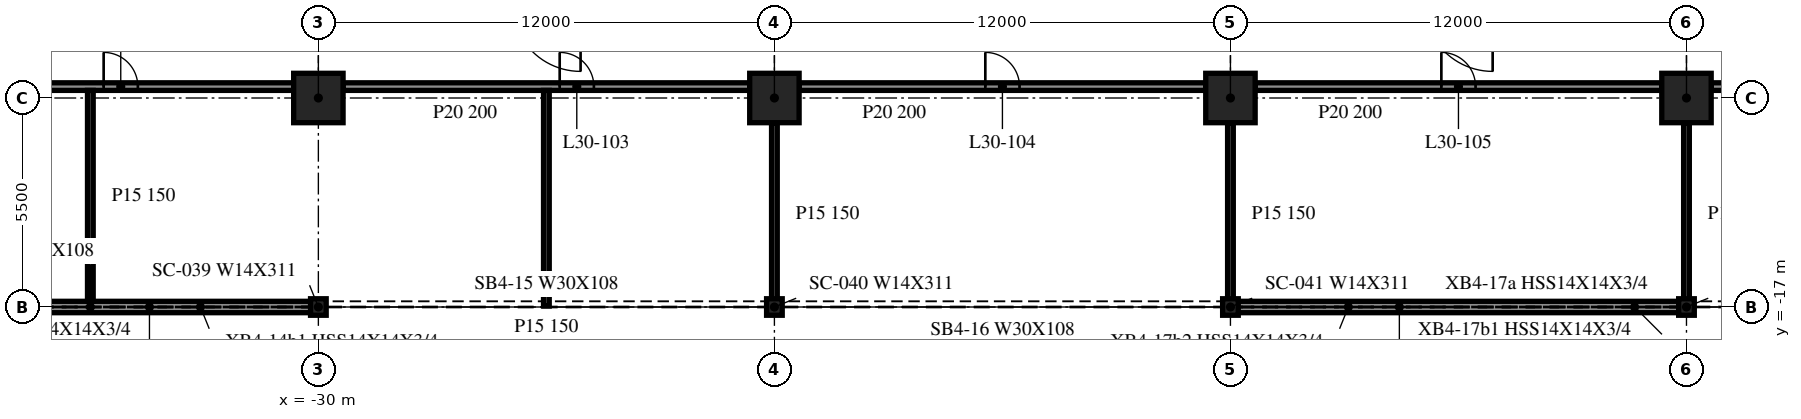
"""IFC4 building model, lengths in metres.
Left out: names, types, materials, properties, quantities, classifications, styles, units other than length and angle.
Written with IfcOpenShell. Run it as: python <this file> out.ifc"""

import sys

from ifc_helpers import new_model, si_unit, direction, frame, frame_2d, origin, origin_2d, place, context, subcontext, project, spatial, rectangle, i_section, extrude, element, fill, save


model = new_model("IFC4")
c1 = context("Model", 3, precision=1e-05, world=origin(), true_north=direction((0.0, 1.0)))
c2 = subcontext(c1, "Body", "Model", "MODEL_VIEW")
j1 = project(units=[si_unit("LENGTHUNIT", "METRE"), si_unit("PLANEANGLEUNIT", "RADIAN")], contexts=[c1])
p1 = place(None, origin())
s1 = spatial("IfcSite", under=j1, at=p1, CompositionType="ELEMENT")
p2 = place(p1, origin())
s2 = spatial("IfcBuilding", under=s1, at=p2, CompositionType="ELEMENT")
p3 = place(p2, frame((0.0, 0.0, 130.2)))
s3 = spatial("IfcBuildingStorey", under=s2, at=p3, CompositionType="ELEMENT", Elevation=130.2)
for number, where, z_axis, x_axis in (
    (1, (-30.0, -11.5, -0.34), (0.0, 0.0, 1.0), (1.0, 0.0, 0.0)),
    (2, (-18.0, -11.5, -0.34), (0.0, 0.0, 1.0), (1.0, 0.0, 0.0)),
    (3, (-6.0, -11.5, -0.34), (0.0, 0.0, 1.0), (1.0, 0.0, 0.0)),
    (4, (6.0, -11.5, -0.34), (0.0, 0.0, 1.0), (1.0, 0.0, 0.0)),
):
    element("IfcColumn", number, at=place(p3, frame(where, z_axis=z_axis, x_axis=x_axis)), inside=s3, PredefinedType="COLUMN", context=c2, shape_type="SweptSolid", body=[
        extrude(rectangle(XDim=1.3, YDim=1.3, at=origin_2d()), origin(), (0.0, 0.0, 1.0), 4.1),
    ])
for number, where, z_axis, x_axis in (
    (5, (-30.0, -17.0, -0.34), (0.0, 0.0, 1.0), (1.0, 0.0, 0.0)),
    (6, (-18.0, -17.0, -0.34), (0.0, 0.0, 1.0), (1.0, 0.0, 0.0)),
    (7, (-6.0, -17.0, -0.34), (0.0, 0.0, 1.0), (1.0, 0.0, 0.0)),
    (8, (6.0, -17.0, -0.34), (0.0, 0.0, 1.0), (1.0, 0.0, 0.0)),
):
    element("IfcColumn", number, at=place(p3, frame(where, z_axis=z_axis, x_axis=x_axis)), inside=s3, PredefinedType="COLUMN", context=c2, shape_type="SweptSolid", body=[
        extrude(i_section(OverallWidth=0.412, OverallDepth=0.434, WebThickness=0.036, FlangeThickness=0.057, at=origin_2d()), origin(), (0.0, 0.0, 1.0), 4.1),
    ])
for number, where, z_axis, x_axis in (
    (9, (-41.982, -17.0, 0.0), (0.0, 0.0, 1.0), (1.0, 0.0, 0.0)),
    (10, (-5.982, -17.0, 0.0), (0.0, 0.0, 1.0), (1.0, 0.0, 0.0)),
):
    element("IfcWall", number, at=place(p3, frame(where, z_axis=z_axis, x_axis=x_axis)), inside=s3, PredefinedType="NOTDEFINED", context=c2, shape_type="SweptSolid", body=[
        extrude(rectangle(XDim=11.964, YDim=0.3, at=frame_2d((5.982, 0.0))), origin(), (0.0, 0.0, 1.0), 3.003),
    ])
p4 = place(p3, frame((-41.35, -11.2, 0.0), z_axis=(0.0, 0.0, 1.0), x_axis=(1.0, 0.0, 0.0)))
e11 = element("IfcWall", 11, at=p4, inside=s3, PredefinedType="PARTITIONING", context=c2, shape_type="SweptSolid", body=[
    extrude(rectangle(XDim=10.7, YDim=0.2, at=frame_2d((5.35, 0.0))), origin(), (0.0, 0.0, 1.0), 3.76),
])
p5 = place(p4, frame((5.7, 0.0, 0.0)))
e12 = element("IfcOpeningElement", 12, at=p5, cuts=e11, PredefinedType="OPENING", context=c2, shape_type="SweptSolid", body=[
    extrude(rectangle(XDim=0.9, YDim=2.1, at=frame_2d((0.45, 1.05))), frame((0.0, 0.11, 0.0), z_axis=(0.0, -1.0, 0.0), x_axis=(1.0, 0.0, 0.0)), (0.0, 0.0, 1.0), 0.22),
])
p6 = place(p3, frame((-29.35, -11.2, 0.0), z_axis=(0.0, 0.0, 1.0), x_axis=(1.0, 0.0, 0.0)))
e13 = element("IfcWall", 13, at=p6, inside=s3, PredefinedType="PARTITIONING", context=c2, shape_type="SweptSolid", body=[
    extrude(rectangle(XDim=10.7, YDim=0.2, at=frame_2d((5.35, 0.0))), origin(), (0.0, 0.0, 1.0), 3.76),
])
p7 = place(p6, frame((5.7, 0.0, 0.0)))
e14 = element("IfcOpeningElement", 14, at=p7, cuts=e13, PredefinedType="OPENING", context=c2, shape_type="SweptSolid", body=[
    extrude(rectangle(XDim=0.9, YDim=2.1, at=frame_2d((0.45, 1.05))), frame((0.0, 0.11, 0.0), z_axis=(0.0, -1.0, 0.0), x_axis=(1.0, 0.0, 0.0)), (0.0, 0.0, 1.0), 0.22),
])
p8 = place(p3, frame((-17.35, -11.2, 0.0), z_axis=(0.0, 0.0, 1.0), x_axis=(1.0, 0.0, 0.0)))
e15 = element("IfcWall", 15, at=p8, inside=s3, PredefinedType="PARTITIONING", context=c2, shape_type="SweptSolid", body=[
    extrude(rectangle(XDim=10.7, YDim=0.2, at=frame_2d((5.35, 0.0))), origin(), (0.0, 0.0, 1.0), 3.76),
])
p9 = place(p8, frame((4.9, 0.0, 0.0)))
e16 = element("IfcOpeningElement", 16, at=p9, cuts=e15, PredefinedType="OPENING", context=c2, shape_type="SweptSolid", body=[
    extrude(rectangle(XDim=0.9, YDim=2.1, at=frame_2d((0.45, 1.05))), frame((0.0, 0.11, 0.0), z_axis=(0.0, -1.0, 0.0), x_axis=(1.0, 0.0, 0.0)), (0.0, 0.0, 1.0), 0.22),
])
p10 = place(p3, frame((-5.35, -11.2, 0.0), z_axis=(0.0, 0.0, 1.0), x_axis=(1.0, 0.0, 0.0)))
e17 = element("IfcWall", 17, at=p10, inside=s3, PredefinedType="PARTITIONING", context=c2, shape_type="SweptSolid", body=[
    extrude(rectangle(XDim=10.7, YDim=0.2, at=frame_2d((5.35, 0.0))), origin(), (0.0, 0.0, 1.0), 3.76),
])
p11 = place(p10, frame((4.9, 0.0, 0.0)))
e18 = element("IfcOpeningElement", 18, at=p11, cuts=e17, PredefinedType="OPENING", context=c2, shape_type="SweptSolid", body=[
    extrude(rectangle(XDim=0.9, YDim=2.1, at=frame_2d((0.45, 1.05))), frame((0.0, 0.11, 0.0), z_axis=(0.0, -1.0, 0.0), x_axis=(1.0, 0.0, 0.0)), (0.0, 0.0, 1.0), 0.22),
])
p12 = place(p3, frame((6.65, -11.2, 0.0), z_axis=(0.0, 0.0, 1.0), x_axis=(1.0, 0.0, 0.0)))
e19 = element("IfcWall", 19, at=p12, inside=s3, PredefinedType="PARTITIONING", context=c2, shape_type="SweptSolid", body=[
    extrude(rectangle(XDim=10.7, YDim=0.2, at=frame_2d((5.35, 0.0))), origin(), (0.0, 0.0, 1.0), 3.76),
])
p13 = place(p12, frame((4.1, 0.0, 0.0)))
e20 = element("IfcOpeningElement", 20, at=p13, cuts=e19, PredefinedType="OPENING", context=c2, shape_type="SweptSolid", body=[
    extrude(rectangle(XDim=0.9, YDim=2.1, at=frame_2d((0.45, 1.05))), frame((0.0, 0.11, 0.0), z_axis=(0.0, -1.0, 0.0), x_axis=(1.0, 0.0, 0.0)), (0.0, 0.0, 1.0), 0.22),
])
p14 = place(p12, frame((5.7, 0.0, 0.0)))
e21 = element("IfcOpeningElement", 21, at=p14, cuts=e19, PredefinedType="OPENING", context=c2, shape_type="SweptSolid", body=[
    extrude(rectangle(XDim=0.9, YDim=2.1, at=frame_2d((0.45, 1.05))), frame((0.0, 0.11, 0.0), z_axis=(0.0, -1.0, 0.0), x_axis=(1.0, 0.0, 0.0)), (0.0, 0.0, 1.0), 0.22),
])
p15 = place(p3, frame((-36.0, -16.85, 0.0), z_axis=(0.0, 0.0, 1.0), x_axis=(0.0, 1.0, 0.0)))
e22 = element("IfcWall", 22, at=p15, inside=s3, PredefinedType="PARTITIONING", context=c2, shape_type="SweptSolid", body=[
    extrude(rectangle(XDim=5.55, YDim=0.15, at=frame_2d((2.775, 0.0))), origin(), (0.0, 0.0, 1.0), 3.76),
])
p16 = place(p3, frame((-24.0, -16.975, 0.0), z_axis=(0.0, 0.0, 1.0), x_axis=(0.0, 1.0, 0.0)))
e23 = element("IfcWall", 23, at=p16, inside=s3, PredefinedType="PARTITIONING", context=c2, shape_type="SweptSolid", body=[
    extrude(rectangle(XDim=5.675, YDim=0.15, at=frame_2d((2.837, 0.0))), origin(), (0.0, 0.0, 1.0), 3.76),
])
for number, where, z_axis, x_axis in (
    (24, (-18.0, -16.975, 0.0), (0.0, 0.0, 1.0), (0.0, 1.0, 0.0)),
    (25, (-6.0, -16.975, 0.0), (0.0, 0.0, 1.0), (0.0, 1.0, 0.0)),
    (26, (6.0, -16.975, 0.0), (0.0, 0.0, 1.0), (0.0, 1.0, 0.0)),
):
    element("IfcWall", number, at=place(p3, frame(where, z_axis=z_axis, x_axis=x_axis)), inside=s3, PredefinedType="PARTITIONING", context=c2, shape_type="SweptSolid", body=[
        extrude(rectangle(XDim=4.825, YDim=0.15, at=frame_2d((2.413, 0.0))), origin(), (0.0, 0.0, 1.0), 3.76),
    ])
p17 = place(p5, origin())
e27 = element("IfcDoor", 27, at=p17, inside=s3, OperationType="SINGLE_SWING_LEFT", PredefinedType="DOOR", context=c2, shape_type="SweptSolid", body=[
    extrude(rectangle(XDim=0.9, YDim=2.1, at=frame_2d((0.45, 1.05))), frame((0.0, 0.025, 0.0), z_axis=(0.0, -1.0, 0.0), x_axis=(1.0, 0.0, 0.0)), (0.0, 0.0, 1.0), 0.05),
])
fill(e12, e27)
p18 = place(p7, origin())
e28 = element("IfcDoor", 28, at=p18, inside=s3, OperationType="SINGLE_SWING_LEFT", PredefinedType="DOOR", context=c2, shape_type="SweptSolid", body=[
    extrude(rectangle(XDim=0.9, YDim=2.1, at=frame_2d((0.45, 1.05))), frame((0.0, 0.025, 0.0), z_axis=(0.0, -1.0, 0.0), x_axis=(1.0, 0.0, 0.0)), (0.0, 0.0, 1.0), 0.05),
])
fill(e14, e28)
p19 = place(p9, origin())
e29 = element("IfcDoor", 29, at=p19, inside=s3, OperationType="SINGLE_SWING_LEFT", PredefinedType="DOOR", context=c2, shape_type="SweptSolid", body=[
    extrude(rectangle(XDim=0.9, YDim=2.1, at=frame_2d((0.45, 1.05))), frame((0.0, 0.025, 0.0), z_axis=(0.0, -1.0, 0.0), x_axis=(1.0, 0.0, 0.0)), (0.0, 0.0, 1.0), 0.05),
])
fill(e16, e29)
p20 = place(p11, origin())
e30 = element("IfcDoor", 30, at=p20, inside=s3, OperationType="SINGLE_SWING_LEFT", PredefinedType="DOOR", context=c2, shape_type="SweptSolid", body=[
    extrude(rectangle(XDim=0.9, YDim=2.1, at=frame_2d((0.45, 1.05))), frame((0.0, 0.025, 0.0), z_axis=(0.0, -1.0, 0.0), x_axis=(1.0, 0.0, 0.0)), (0.0, 0.0, 1.0), 0.05),
])
fill(e18, e30)
save(model, sys.argv[1])
